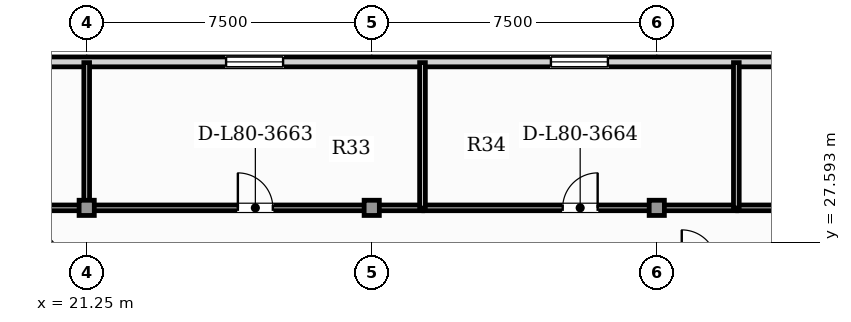
"""IFC4 building model, lengths in metres.
Left out: names, types, materials, properties, quantities, classifications, styles, units other than length and angle.
Written with IfcOpenShell. Run it as: python <this file> out.ifc"""

import sys

from ifc_helpers import new_model, si_unit, direction, frame, frame_2d, origin, origin_2d, place, context, subcontext, project, spatial, rectangle, hollow_rectangle, extrude, element, fill, save


model = new_model("IFC4")
c1 = context("Model", 3, precision=1e-05, world=origin(), true_north=direction((0.0, 1.0)))
c2 = subcontext(c1, "Body", "Model", "MODEL_VIEW")
j1 = project(units=[si_unit("LENGTHUNIT", "METRE"), si_unit("PLANEANGLEUNIT", "RADIAN")], contexts=[c1])
p1 = place(None, origin())
s1 = spatial("IfcSite", under=j1, at=p1, CompositionType="ELEMENT")
p2 = place(p1, origin())
s2 = spatial("IfcBuilding", under=s1, at=p2, CompositionType="ELEMENT")
p3 = place(p2, frame((0.0, 0.0, 324.6)))
s3 = spatial("IfcBuildingStorey", under=s2, at=p3, CompositionType="ELEMENT", Elevation=324.6)
for number, where, z_axis, x_axis in (
    (1, (21.25, 28.5, 0.0), (0.0, 0.0, 1.0), (1.0, 0.0, 0.0)),
    (2, (28.75, 28.5, 0.0), (0.0, 0.0, 1.0), (1.0, 0.0, 0.0)),
    (3, (36.25, 28.5, 0.0), (0.0, 0.0, 1.0), (1.0, 0.0, 0.0)),
):
    element("IfcColumn", number, at=place(p3, frame(where, z_axis=z_axis, x_axis=x_axis)), inside=s3, PredefinedType="COLUMN", context=c2, shape_type="SweptSolid", body=[
        extrude(hollow_rectangle(XDim=0.4, YDim=0.4, WallThickness=0.02, at=origin_2d()), origin(), (0.0, 0.0, 1.0), 3.85),
    ])
p4 = place(p3, frame((45.125, 32.341, 0.0), z_axis=(0.0, 0.0, 1.0), x_axis=(-1.0, 0.0, 0.0)))
e4 = element("IfcWall", 4, at=p4, inside=s3, PredefinedType="SOLIDWALL", context=c2, shape_type="SweptSolid", body=[
    extrude(rectangle(XDim=32.75, YDim=0.26, at=frame_2d((16.375, 0.0))), origin(), (0.0, 0.0, 1.0), 3.65),
])
p5 = place(p4, frame((30.479, 0.0, 0.9)))
e5 = element("IfcOpeningElement", 5, at=p5, cuts=e4, PredefinedType="OPENING", context=c2, shape_type="SweptSolid", body=[
    extrude(rectangle(XDim=1.5, YDim=1.95, at=frame_2d((0.75, 0.975))), frame((0.0, 0.14, 0.0), z_axis=(0.0, -1.0, 0.0), x_axis=(1.0, 0.0, 0.0)), (0.0, 0.0, 1.0), 0.28),
])
p6 = place(p4, frame((18.707, 0.0, 0.9)))
e6 = element("IfcOpeningElement", 6, at=p6, cuts=e4, PredefinedType="OPENING", context=c2, shape_type="SweptSolid", body=[
    extrude(rectangle(XDim=1.5, YDim=1.95, at=frame_2d((0.75, 0.975))), frame((0.0, 0.14, 0.0), z_axis=(0.0, -1.0, 0.0), x_axis=(1.0, 0.0, 0.0)), (0.0, 0.0, 1.0), 0.28),
])
p7 = place(p4, frame((10.16, 0.0, 0.9)))
e7 = element("IfcOpeningElement", 7, at=p7, cuts=e4, PredefinedType="OPENING", context=c2, shape_type="SweptSolid", body=[
    extrude(rectangle(XDim=1.5, YDim=1.95, at=frame_2d((0.75, 0.975))), frame((0.0, 0.14, 0.0), z_axis=(0.0, -1.0, 0.0), x_axis=(1.0, 0.0, 0.0)), (0.0, 0.0, 1.0), 0.28),
])
p8 = place(p3, frame((9.285, 28.5, 0.0), z_axis=(0.0, 0.0, 1.0), x_axis=(1.0, 0.0, 0.0)))
e8 = element("IfcWall", 8, at=p8, inside=s3, PredefinedType="PARTITIONING", context=c2, shape_type="SweptSolid", body=[
    extrude(rectangle(XDim=11.97, YDim=0.15, at=frame_2d((5.985, 0.0))), origin(), (0.0, 0.0, 1.0), 3.117),
])
p9 = place(p8, frame((5.525, 0.0, 0.0)))
e9 = element("IfcOpeningElement", 9, at=p9, cuts=e8, PredefinedType="OPENING", context=c2, shape_type="SweptSolid", body=[
    extrude(rectangle(XDim=0.92, YDim=2.1, at=frame_2d((0.46, 1.05))), frame((0.0, 0.085, 0.0), z_axis=(0.0, -1.0, 0.0), x_axis=(1.0, 0.0, 0.0)), (0.0, 0.0, 1.0), 0.17),
])
p10 = place(p3, frame((21.285, 28.5, 0.0), z_axis=(0.0, 0.0, 1.0), x_axis=(1.0, 0.0, 0.0)))
e10 = element("IfcWall", 10, at=p10, inside=s3, PredefinedType="PARTITIONING", context=c2, shape_type="SweptSolid", body=[
    extrude(rectangle(XDim=8.805, YDim=0.15, at=frame_2d((4.403, 0.0))), origin(), (0.0, 0.0, 1.0), 3.117),
])
p11 = place(p10, frame((3.943, 0.0, 0.0)))
e11 = element("IfcOpeningElement", 11, at=p11, cuts=e10, PredefinedType="OPENING", context=c2, shape_type="SweptSolid", body=[
    extrude(rectangle(XDim=0.92, YDim=2.1, at=frame_2d((0.46, 1.05))), frame((0.0, 0.085, 0.0), z_axis=(0.0, -1.0, 0.0), x_axis=(1.0, 0.0, 0.0)), (0.0, 0.0, 1.0), 0.17),
])
p12 = place(p3, frame((30.12, 28.5, 0.0), z_axis=(0.0, 0.0, 1.0), x_axis=(1.0, 0.0, 0.0)))
e12 = element("IfcWall", 12, at=p12, inside=s3, PredefinedType="PARTITIONING", context=c2, shape_type="SweptSolid", body=[
    extrude(rectangle(XDim=8.228, YDim=0.15, at=frame_2d((4.114, 0.0))), origin(), (0.0, 0.0, 1.0), 3.117),
])
p13 = place(p12, frame((3.654, 0.0, 0.0)))
e13 = element("IfcOpeningElement", 13, at=p13, cuts=e12, PredefinedType="OPENING", context=c2, shape_type="SweptSolid", body=[
    extrude(rectangle(XDim=0.92, YDim=2.1, at=frame_2d((0.46, 1.05))), frame((0.0, 0.085, 0.0), z_axis=(0.0, -1.0, 0.0), x_axis=(1.0, 0.0, 0.0)), (0.0, 0.0, 1.0), 0.17),
])
p14 = place(p3, frame((38.379, 28.5, 0.0), z_axis=(0.0, 0.0, 1.0), x_axis=(1.0, 0.0, 0.0)))
e14 = element("IfcWall", 14, at=p14, inside=s3, PredefinedType="PARTITIONING", context=c2, shape_type="SweptSolid", body=[
    extrude(rectangle(XDim=9.837, YDim=0.15, at=frame_2d((4.918, 0.0))), origin(), (0.0, 0.0, 1.0), 3.117),
])
p15 = place(p14, frame((2.983, 0.0, 0.0)))
e15 = element("IfcOpeningElement", 15, at=p15, cuts=e14, PredefinedType="OPENING", context=c2, shape_type="SweptSolid", body=[
    extrude(rectangle(XDim=0.92, YDim=2.1, at=frame_2d((0.46, 1.05))), frame((0.0, 0.085, 0.0), z_axis=(0.0, -1.0, 0.0), x_axis=(1.0, 0.0, 0.0)), (0.0, 0.0, 1.0), 0.17),
])
for number, where, z_axis, x_axis in (
    (16, (21.25, 28.495, 0.0), (0.0, 0.0, 1.0), (0.0, 1.0, 0.0)),
    (17, (30.085, 28.495, 0.0), (0.0, 0.0, 1.0), (0.0, 1.0, 0.0)),
    (18, (38.344, 28.495, 0.0), (0.0, 0.0, 1.0), (0.0, 1.0, 0.0)),
):
    element("IfcWall", number, at=place(p3, frame(where, z_axis=z_axis, x_axis=x_axis)), inside=s3, PredefinedType="PARTITIONING", context=c2, shape_type="SweptSolid", body=[
        extrude(rectangle(XDim=3.826, YDim=0.15, at=frame_2d((1.913, 0.0))), origin(), (0.0, 0.0, 1.0), 3.65),
    ])
p16 = place(p6, origin())
e19 = element("IfcWindow", 19, at=p16, inside=s3, PartitioningType="SINGLE_PANEL", PredefinedType="WINDOW", context=c2, shape_type="SweptSolid", body=[
    extrude(rectangle(XDim=1.5, YDim=1.95, at=frame_2d((0.75, 0.975))), frame((0.0, 0.03, 0.0), z_axis=(0.0, -1.0, 0.0), x_axis=(1.0, 0.0, 0.0)), (0.0, 0.0, 1.0), 0.06),
])
fill(e6, e19)
p17 = place(p7, origin())
e20 = element("IfcWindow", 20, at=p17, inside=s3, PartitioningType="SINGLE_PANEL", PredefinedType="WINDOW", context=c2, shape_type="SweptSolid", body=[
    extrude(rectangle(XDim=1.5, YDim=1.95, at=frame_2d((0.75, 0.975))), frame((0.0, 0.03, 0.0), z_axis=(0.0, -1.0, 0.0), x_axis=(1.0, 0.0, 0.0)), (0.0, 0.0, 1.0), 0.06),
])
fill(e7, e20)
p18 = place(p11, origin())
e21 = element("IfcDoor", 21, at=p18, inside=s3, OperationType="SINGLE_SWING_LEFT", PredefinedType="DOOR", context=c2, shape_type="SweptSolid", body=[
    extrude(rectangle(XDim=0.92, YDim=2.1, at=frame_2d((0.46, 1.05))), frame((0.0, 0.025, 0.0), z_axis=(0.0, -1.0, 0.0), x_axis=(1.0, 0.0, 0.0)), (0.0, 0.0, 1.0), 0.05),
])
fill(e11, e21)
p19 = place(p13, origin())
e22 = element("IfcDoor", 22, at=p19, inside=s3, OperationType="SINGLE_SWING_RIGHT", PredefinedType="DOOR", context=c2, shape_type="SweptSolid", body=[
    extrude(rectangle(XDim=0.92, YDim=2.1, at=frame_2d((0.46, 1.05))), frame((0.0, 0.025, 0.0), z_axis=(0.0, -1.0, 0.0), x_axis=(1.0, 0.0, 0.0)), (0.0, 0.0, 1.0), 0.05),
])
fill(e13, e22)
save(model, sys.argv[1])
